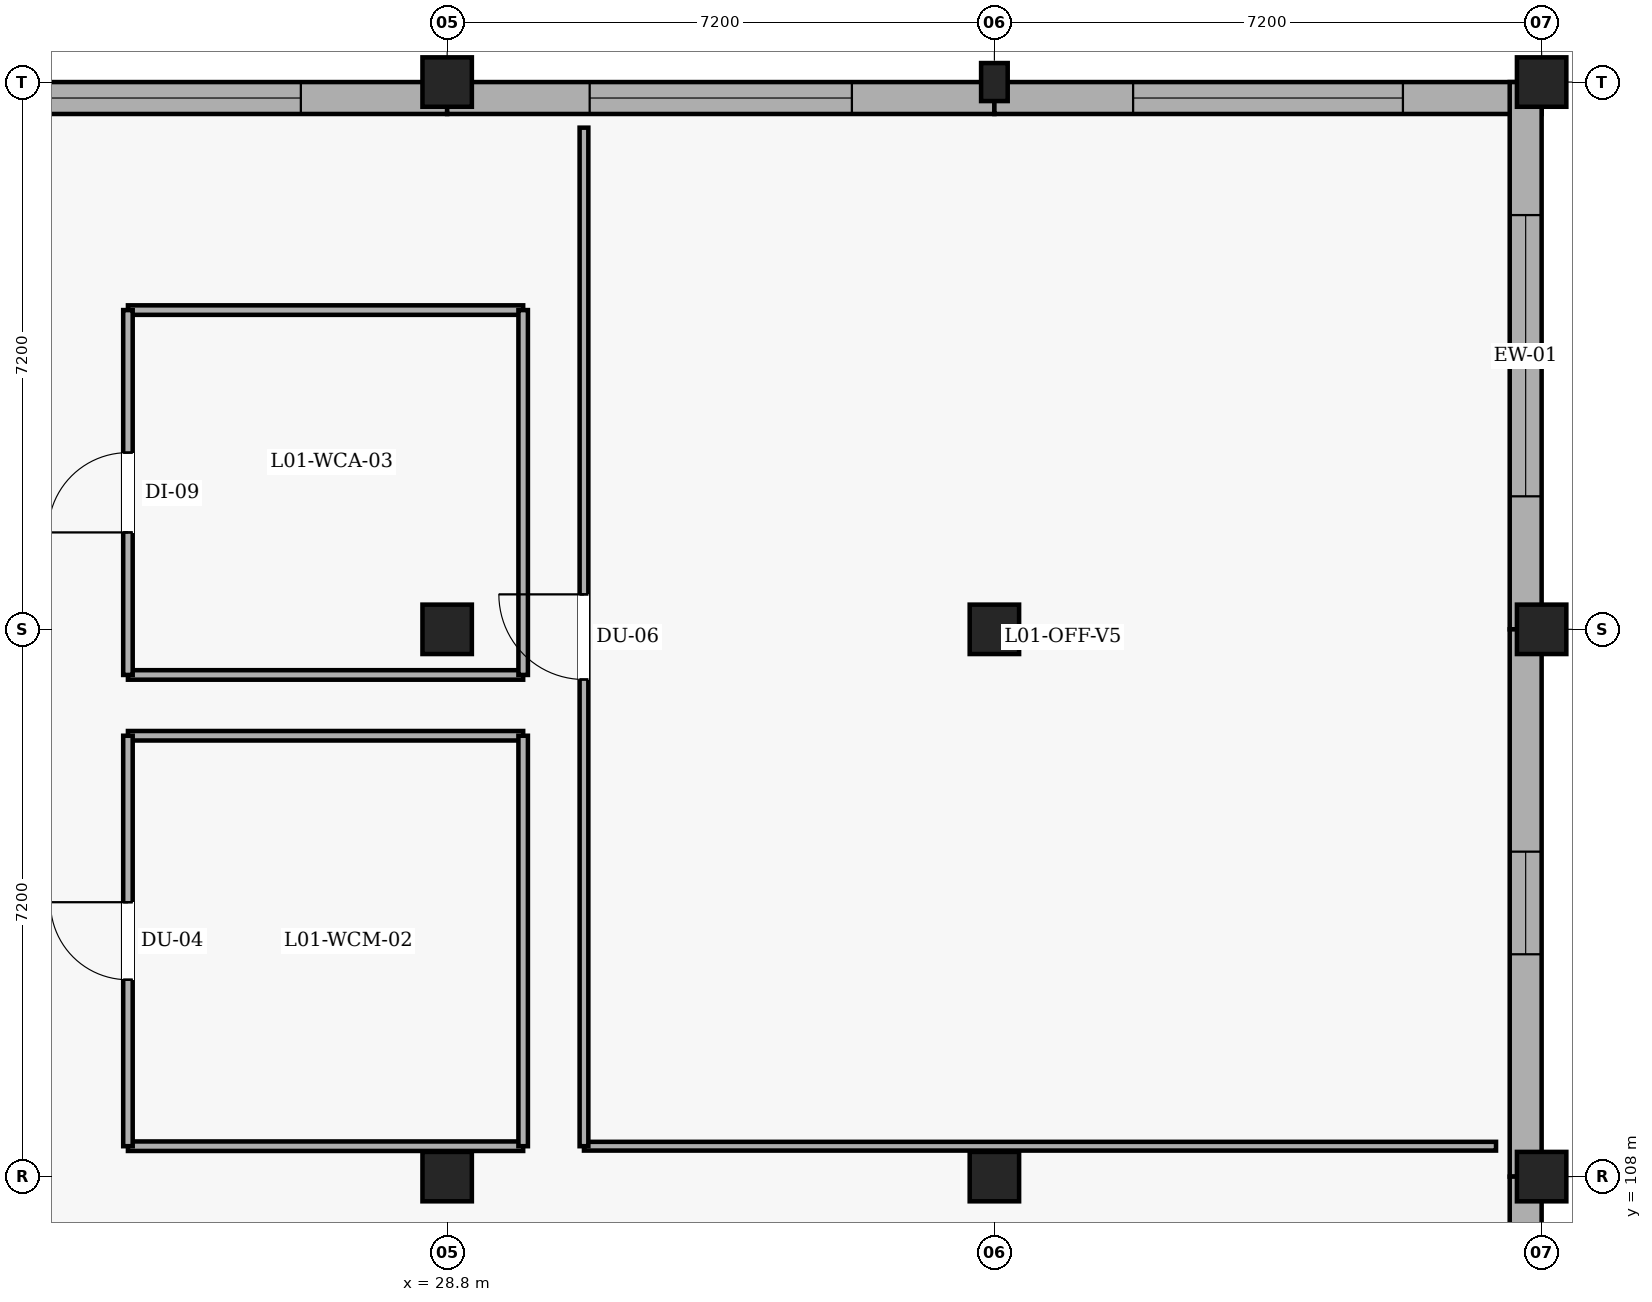
"""IFC4 building model, lengths in metres.
Left out: names, types, materials, properties, quantities, classifications, styles, units other than length and angle.
Written with IfcOpenShell. Run it as: python <this file> out.ifc"""

import sys

from ifc_helpers import new_model, si_unit, direction, frame, frame_2d, origin, origin_2d, place, context, subcontext, project, spatial, rectangle, extrude, element, fill, save


model = new_model("IFC4")
c1 = context("Model", 3, precision=1e-05, world=origin(), true_north=direction((0.0, 1.0)))
c2 = subcontext(c1, "Body", "Model", "MODEL_VIEW")
j1 = project(units=[si_unit("LENGTHUNIT", "METRE"), si_unit("PLANEANGLEUNIT", "RADIAN")], contexts=[c1])
p1 = place(None, origin())
s1 = spatial("IfcSite", under=j1, at=p1, CompositionType="ELEMENT")
p2 = place(p1, origin())
s2 = spatial("IfcBuilding", under=s1, at=p2, CompositionType="ELEMENT")
p3 = place(p2, frame((0.0, 0.0, 5.4)))
s3 = spatial("IfcBuildingStorey", under=s2, at=p3, CompositionType="ELEMENT", Elevation=5.4)
for number, where, z_axis, x_axis in (
    (1, (28.8, 108.0, 0.0), (0.0, 0.0, 1.0), (1.0, 0.0, 0.0)),
    (2, (28.8, 115.2, 0.0), (0.0, 0.0, 1.0), (1.0, 0.0, 0.0)),
    (3, (28.8, 122.4, 0.0), (0.0, 0.0, 1.0), (1.0, 0.0, 0.0)),
    (4, (36.0, 108.0, 0.0), (0.0, 0.0, 1.0), (1.0, 0.0, 0.0)),
    (5, (36.0, 115.2, 0.0), (0.0, 0.0, 1.0), (1.0, 0.0, 0.0)),
):
    element("IfcColumn", number, at=place(p3, frame(where, z_axis=z_axis, x_axis=x_axis)), inside=s3, PredefinedType="COLUMN", context=c2, shape_type="SweptSolid", body=[
        extrude(rectangle(XDim=0.65, YDim=0.65, at=origin_2d()), origin(), (0.0, 0.0, 1.0), 3.88),
    ])
p4 = place(p3, frame((36.0, 122.4, 0.0), z_axis=(0.0, 0.0, 1.0), x_axis=(1.0, 0.0, 0.0)))
e6 = element("IfcColumn", 6, at=p4, inside=s3, PredefinedType="PILASTER", context=c2, shape_type="SweptSolid", body=[
    extrude(rectangle(XDim=0.35, YDim=0.5, at=origin_2d()), origin(), (0.0, 0.0, 1.0), 3.88),
])
for number, where, z_axis, x_axis in (
    (7, (43.2, 108.0, 0.0), (0.0, 0.0, 1.0), (1.0, 0.0, 0.0)),
    (8, (43.2, 115.2, 0.0), (0.0, 0.0, 1.0), (1.0, 0.0, 0.0)),
    (9, (43.2, 122.4, 0.0), (0.0, 0.0, 1.0), (1.0, 0.0, 0.0)),
):
    element("IfcColumn", number, at=place(p3, frame(where, z_axis=z_axis, x_axis=x_axis)), inside=s3, PredefinedType="COLUMN", context=c2, shape_type="SweptSolid", body=[
        extrude(rectangle(XDim=0.65, YDim=0.65, at=origin_2d()), origin(), (0.0, 0.0, 1.0), 3.88),
    ])
p5 = place(p3, frame((21.6, 122.19, 0.0), z_axis=(0.0, 0.0, 1.0), x_axis=(1.0, 0.0, 0.0)))
e10 = element("IfcWall", 10, at=p5, inside=s3, PredefinedType="SOLIDWALL", context=c2, shape_type="SweptSolid", body=[
    extrude(rectangle(XDim=7.2, YDim=0.42, at=frame_2d((3.6, 0.0))), origin(), (0.0, 0.0, 1.0), 3.58),
])
p6 = place(p5, frame((1.925, 0.0, 0.9)))
e11 = element("IfcOpeningElement", 11, at=p6, cuts=e10, PredefinedType="OPENING", context=c2, shape_type="SweptSolid", body=[
    extrude(rectangle(XDim=3.35, YDim=1.8, at=frame_2d((1.675, 0.9))), frame((0.0, 0.22, 0.0), z_axis=(0.0, -1.0, 0.0), x_axis=(1.0, 0.0, 0.0)), (0.0, 0.0, 1.0), 0.44),
])
p7 = place(p3, frame((28.8, 122.19, 0.0), z_axis=(0.0, 0.0, 1.0), x_axis=(1.0, 0.0, 0.0)))
e12 = element("IfcWall", 12, at=p7, inside=s3, PredefinedType="SOLIDWALL", context=c2, shape_type="SweptSolid", body=[
    extrude(rectangle(XDim=7.2, YDim=0.42, at=frame_2d((3.6, 0.0))), origin(), (0.0, 0.0, 1.0), 3.58),
])
p8 = place(p7, frame((1.875, 0.0, 0.9)))
e13 = element("IfcOpeningElement", 13, at=p8, cuts=e12, PredefinedType="OPENING", context=c2, shape_type="SweptSolid", body=[
    extrude(rectangle(XDim=3.45, YDim=1.85, at=frame_2d((1.725, 0.925))), frame((0.0, 0.22, 0.0), z_axis=(0.0, -1.0, 0.0), x_axis=(1.0, 0.0, 0.0)), (0.0, 0.0, 1.0), 0.44),
])
p9 = place(p3, frame((36.0, 122.19, 0.0), z_axis=(0.0, 0.0, 1.0), x_axis=(1.0, 0.0, 0.0)))
e14 = element("IfcWall", 14, at=p9, inside=s3, PredefinedType="SOLIDWALL", context=c2, shape_type="SweptSolid", body=[
    extrude(rectangle(XDim=7.2, YDim=0.42, at=frame_2d((3.6, 0.0))), origin(), (0.0, 0.0, 1.0), 3.58),
])
p10 = place(p9, frame((1.825, 0.0, 0.9)))
e15 = element("IfcOpeningElement", 15, at=p10, cuts=e14, PredefinedType="OPENING", context=c2, shape_type="SweptSolid", body=[
    extrude(rectangle(XDim=3.55, YDim=1.65, at=frame_2d((1.775, 0.825))), frame((0.0, 0.22, 0.0), z_axis=(0.0, -1.0, 0.0), x_axis=(1.0, 0.0, 0.0)), (0.0, 0.0, 1.0), 0.44),
])
p11 = place(p3, frame((42.99, 122.4, 0.0), z_axis=(0.0, 0.0, 1.0), x_axis=(0.0, -1.0, 0.0)))
e16 = element("IfcWall", 16, at=p11, inside=s3, PredefinedType="SOLIDWALL", context=c2, shape_type="SweptSolid", body=[
    extrude(rectangle(XDim=7.2, YDim=0.42, at=frame_2d((3.6, 0.0))), origin(), (0.0, 0.0, 1.0), 3.55),
])
p12 = place(p11, frame((1.75, 0.0, 0.9)))
e17 = element("IfcOpeningElement", 17, at=p12, cuts=e16, PredefinedType="OPENING", context=c2, shape_type="SweptSolid", body=[
    extrude(rectangle(XDim=3.7, YDim=1.75, at=frame_2d((1.85, 0.875))), frame((0.0, 0.22, 0.0), z_axis=(0.0, -1.0, 0.0), x_axis=(1.0, 0.0, 0.0)), (0.0, 0.0, 1.0), 0.44),
])
p13 = place(p3, frame((42.99, 115.2, 0.0), z_axis=(0.0, 0.0, 1.0), x_axis=(0.0, -1.0, 0.0)))
e18 = element("IfcWall", 18, at=p13, inside=s3, PredefinedType="SOLIDWALL", context=c2, shape_type="SweptSolid", body=[
    extrude(rectangle(XDim=7.2, YDim=0.42, at=frame_2d((3.6, 0.0))), origin(), (0.0, 0.0, 1.0), 3.55),
])
p14 = place(p13, frame((2.925, 0.0, 0.9)))
e19 = element("IfcOpeningElement", 19, at=p14, cuts=e18, PredefinedType="OPENING", context=c2, shape_type="SweptSolid", body=[
    extrude(rectangle(XDim=1.35, YDim=1.35, at=frame_2d((0.675, 0.675))), frame((0.0, 0.22, 0.0), z_axis=(0.0, -1.0, 0.0), x_axis=(1.0, 0.0, 0.0)), (0.0, 0.0, 1.0), 0.44),
])
p15 = place(p3, frame((42.99, 108.0, 0.0), z_axis=(0.0, 0.0, 1.0), x_axis=(0.0, -1.0, 0.0)))
e20 = element("IfcWall", 20, at=p15, inside=s3, PredefinedType="SOLIDWALL", context=c2, shape_type="SweptSolid", body=[
    extrude(rectangle(XDim=7.2, YDim=0.42, at=frame_2d((3.6, 0.0))), origin(), (0.0, 0.0, 1.0), 3.55),
])
p16 = place(p15, frame((2.875, 0.0, 0.9)))
e21 = element("IfcOpeningElement", 21, at=p16, cuts=e20, PredefinedType="OPENING", context=c2, shape_type="SweptSolid", body=[
    extrude(rectangle(XDim=1.45, YDim=1.45, at=frame_2d((0.725, 0.725))), frame((0.0, 0.22, 0.0), z_axis=(0.0, -1.0, 0.0), x_axis=(1.0, 0.0, 0.0)), (0.0, 0.0, 1.0), 0.44),
])
for number, where, z_axis, x_axis in (
    (22, (24.6, 113.8, 0.0), (0.0, 0.0, 1.0), (1.0, 0.0, 0.0)),
    (23, (29.8, 108.4, 0.0), (0.0, 0.0, 1.0), (-1.0, 0.0, 0.0)),
):
    element("IfcWall", number, at=place(p3, frame(where, z_axis=z_axis, x_axis=x_axis)), inside=s3, PredefinedType="PARTITIONING", context=c2, shape_type="SweptSolid", body=[
        extrude(rectangle(XDim=5.2, YDim=0.125, at=frame_2d((2.6, 0.0))), origin(), (0.0, 0.0, 1.0), 3.43),
    ])
p17 = place(p3, frame((29.8, 113.8, 0.0), z_axis=(0.0, 0.0, 1.0), x_axis=(0.0, -1.0, 0.0)))
e24 = element("IfcWall", 24, at=p17, inside=s3, PredefinedType="PARTITIONING", context=c2, shape_type="SweptSolid", body=[
    extrude(rectangle(XDim=5.4, YDim=0.125, at=frame_2d((2.7, 0.0))), origin(), (0.0, 0.0, 1.0), 3.55),
])
p18 = place(p3, frame((24.6, 108.4, 0.0), z_axis=(0.0, 0.0, 1.0), x_axis=(0.0, 1.0, 0.0)))
e25 = element("IfcWall", 25, at=p18, inside=s3, PredefinedType="PARTITIONING", context=c2, shape_type="SweptSolid", body=[
    extrude(rectangle(XDim=5.4, YDim=0.125, at=frame_2d((2.7, 0.0))), origin(), (0.0, 0.0, 1.0), 3.55),
])
p19 = place(p18, frame((2.19, 0.0, 0.0)))
e26 = element("IfcOpeningElement", 26, at=p19, cuts=e25, PredefinedType="OPENING", context=c2, shape_type="SweptSolid", body=[
    extrude(rectangle(XDim=1.02, YDim=2.12, at=frame_2d((0.51, 1.06))), frame((0.0, 0.073, 0.0), z_axis=(0.0, -1.0, 0.0), x_axis=(1.0, 0.0, 0.0)), (0.0, 0.0, 1.0), 0.145),
])
for number, where, z_axis, x_axis in (
    (27, (24.6, 119.4, 0.0), (0.0, 0.0, 1.0), (1.0, 0.0, 0.0)),
    (28, (29.8, 114.6, 0.0), (0.0, 0.0, 1.0), (-1.0, 0.0, 0.0)),
):
    element("IfcWall", number, at=place(p3, frame(where, z_axis=z_axis, x_axis=x_axis)), inside=s3, PredefinedType="PARTITIONING", context=c2, shape_type="SweptSolid", body=[
        extrude(rectangle(XDim=5.2, YDim=0.125, at=frame_2d((2.6, 0.0))), origin(), (0.0, 0.0, 1.0), 3.43),
    ])
p20 = place(p3, frame((29.8, 119.4, 0.0), z_axis=(0.0, 0.0, 1.0), x_axis=(0.0, -1.0, 0.0)))
e29 = element("IfcWall", 29, at=p20, inside=s3, PredefinedType="PARTITIONING", context=c2, shape_type="SweptSolid", body=[
    extrude(rectangle(XDim=4.8, YDim=0.125, at=frame_2d((2.4, 0.0))), origin(), (0.0, 0.0, 1.0), 3.43),
])
p21 = place(p3, frame((24.6, 114.6, 0.0), z_axis=(0.0, 0.0, 1.0), x_axis=(0.0, 1.0, 0.0)))
e30 = element("IfcWall", 30, at=p21, inside=s3, PredefinedType="PARTITIONING", context=c2, shape_type="SweptSolid", body=[
    extrude(rectangle(XDim=4.8, YDim=0.125, at=frame_2d((2.4, 0.0))), origin(), (0.0, 0.0, 1.0), 3.43),
])
p22 = place(p21, frame((1.875, 0.0, 0.0)))
e31 = element("IfcOpeningElement", 31, at=p22, cuts=e30, PredefinedType="OPENING", context=c2, shape_type="SweptSolid", body=[
    extrude(rectangle(XDim=1.05, YDim=2.1, at=frame_2d((0.525, 1.05))), frame((0.0, 0.073, 0.0), z_axis=(0.0, -1.0, 0.0), x_axis=(1.0, 0.0, 0.0)), (0.0, 0.0, 1.0), 0.145),
])
p23 = place(p3, frame((42.6, 108.4, 0.0), z_axis=(0.0, 0.0, 1.0), x_axis=(-1.0, 0.0, 0.0)))
e32 = element("IfcWall", 32, at=p23, inside=s3, PredefinedType="PARTITIONING", context=c2, shape_type="SweptSolid", body=[
    extrude(rectangle(XDim=12.0, YDim=0.115, at=frame_2d((6.0, 0.0))), origin(), (0.0, 0.0, 1.0), 3.43),
])
p24 = place(p3, frame((30.6, 108.4, 0.0), z_axis=(0.0, 0.0, 1.0), x_axis=(0.0, 1.0, 0.0)))
e33 = element("IfcWall", 33, at=p24, inside=s3, PredefinedType="PARTITIONING", context=c2, shape_type="SweptSolid", body=[
    extrude(rectangle(XDim=13.4, YDim=0.115, at=frame_2d((6.7, 0.0))), origin(), (0.0, 0.0, 1.0), 3.43),
])
p25 = place(p24, frame((6.14, 0.0, 0.0)))
e34 = element("IfcOpeningElement", 34, at=p25, cuts=e33, PredefinedType="OPENING", context=c2, shape_type="SweptSolid", body=[
    extrude(rectangle(XDim=1.12, YDim=2.15, at=frame_2d((0.56, 1.075))), frame((0.0, 0.067, 0.0), z_axis=(0.0, -1.0, 0.0), x_axis=(1.0, 0.0, 0.0)), (0.0, 0.0, 1.0), 0.135),
])
p26 = place(p6, origin())
e35 = element("IfcWindow", 35, at=p26, inside=s3, PartitioningType="SINGLE_PANEL", PredefinedType="WINDOW", context=c2, shape_type="SweptSolid", body=[
    extrude(rectangle(XDim=3.35, YDim=1.8, at=frame_2d((1.675, 0.9))), frame((0.0, 0.03, 0.0), z_axis=(0.0, -1.0, 0.0), x_axis=(1.0, 0.0, 0.0)), (0.0, 0.0, 1.0), 0.06),
])
fill(e11, e35)
p27 = place(p8, origin())
e36 = element("IfcWindow", 36, at=p27, inside=s3, PartitioningType="SINGLE_PANEL", PredefinedType="WINDOW", context=c2, shape_type="SweptSolid", body=[
    extrude(rectangle(XDim=3.45, YDim=1.85, at=frame_2d((1.725, 0.925))), frame((0.0, 0.03, 0.0), z_axis=(0.0, -1.0, 0.0), x_axis=(1.0, 0.0, 0.0)), (0.0, 0.0, 1.0), 0.06),
])
fill(e13, e36)
p28 = place(p10, origin())
e37 = element("IfcWindow", 37, at=p28, inside=s3, PartitioningType="SINGLE_PANEL", PredefinedType="WINDOW", context=c2, shape_type="SweptSolid", body=[
    extrude(rectangle(XDim=3.55, YDim=1.65, at=frame_2d((1.775, 0.825))), frame((0.0, 0.03, 0.0), z_axis=(0.0, -1.0, 0.0), x_axis=(1.0, 0.0, 0.0)), (0.0, 0.0, 1.0), 0.06),
])
fill(e15, e37)
p29 = place(p12, origin())
e38 = element("IfcWindow", 38, at=p29, inside=s3, PartitioningType="SINGLE_PANEL", PredefinedType="WINDOW", context=c2, shape_type="SweptSolid", body=[
    extrude(rectangle(XDim=3.7, YDim=1.75, at=frame_2d((1.85, 0.875))), frame((0.0, 0.03, 0.0), z_axis=(0.0, -1.0, 0.0), x_axis=(1.0, 0.0, 0.0)), (0.0, 0.0, 1.0), 0.06),
])
fill(e17, e38)
p30 = place(p14, origin())
e39 = element("IfcWindow", 39, at=p30, inside=s3, PartitioningType="SINGLE_PANEL", PredefinedType="WINDOW", context=c2, shape_type="SweptSolid", body=[
    extrude(rectangle(XDim=1.35, YDim=1.35, at=frame_2d((0.675, 0.675))), frame((0.0, 0.03, 0.0), z_axis=(0.0, -1.0, 0.0), x_axis=(1.0, 0.0, 0.0)), (0.0, 0.0, 1.0), 0.06),
])
fill(e19, e39)
p31 = place(p19, origin())
e40 = element("IfcDoor", 40, at=p31, inside=s3, OperationType="SINGLE_SWING_RIGHT", PredefinedType="DOOR", context=c2, shape_type="SweptSolid", body=[
    extrude(rectangle(XDim=1.02, YDim=2.12, at=frame_2d((0.51, 1.06))), frame((0.0, 0.025, 0.0), z_axis=(0.0, -1.0, 0.0), x_axis=(1.0, 0.0, 0.0)), (0.0, 0.0, 1.0), 0.05),
])
fill(e26, e40)
p32 = place(p22, origin())
e41 = element("IfcDoor", 41, at=p32, inside=s3, OperationType="SINGLE_SWING_LEFT", PredefinedType="DOOR", context=c2, shape_type="SweptSolid", body=[
    extrude(rectangle(XDim=1.05, YDim=2.1, at=frame_2d((0.525, 1.05))), frame((0.0, 0.025, 0.0), z_axis=(0.0, -1.0, 0.0), x_axis=(1.0, 0.0, 0.0)), (0.0, 0.0, 1.0), 0.05),
])
fill(e31, e41)
p33 = place(p25, origin())
e42 = element("IfcDoor", 42, at=p33, inside=s3, OperationType="SINGLE_SWING_RIGHT", PredefinedType="DOOR", context=c2, shape_type="SweptSolid", body=[
    extrude(rectangle(XDim=1.12, YDim=2.15, at=frame_2d((0.56, 1.075))), frame((0.0, 0.025, 0.0), z_axis=(0.0, -1.0, 0.0), x_axis=(1.0, 0.0, 0.0)), (0.0, 0.0, 1.0), 0.05),
])
fill(e34, e42)
save(model, sys.argv[1])
